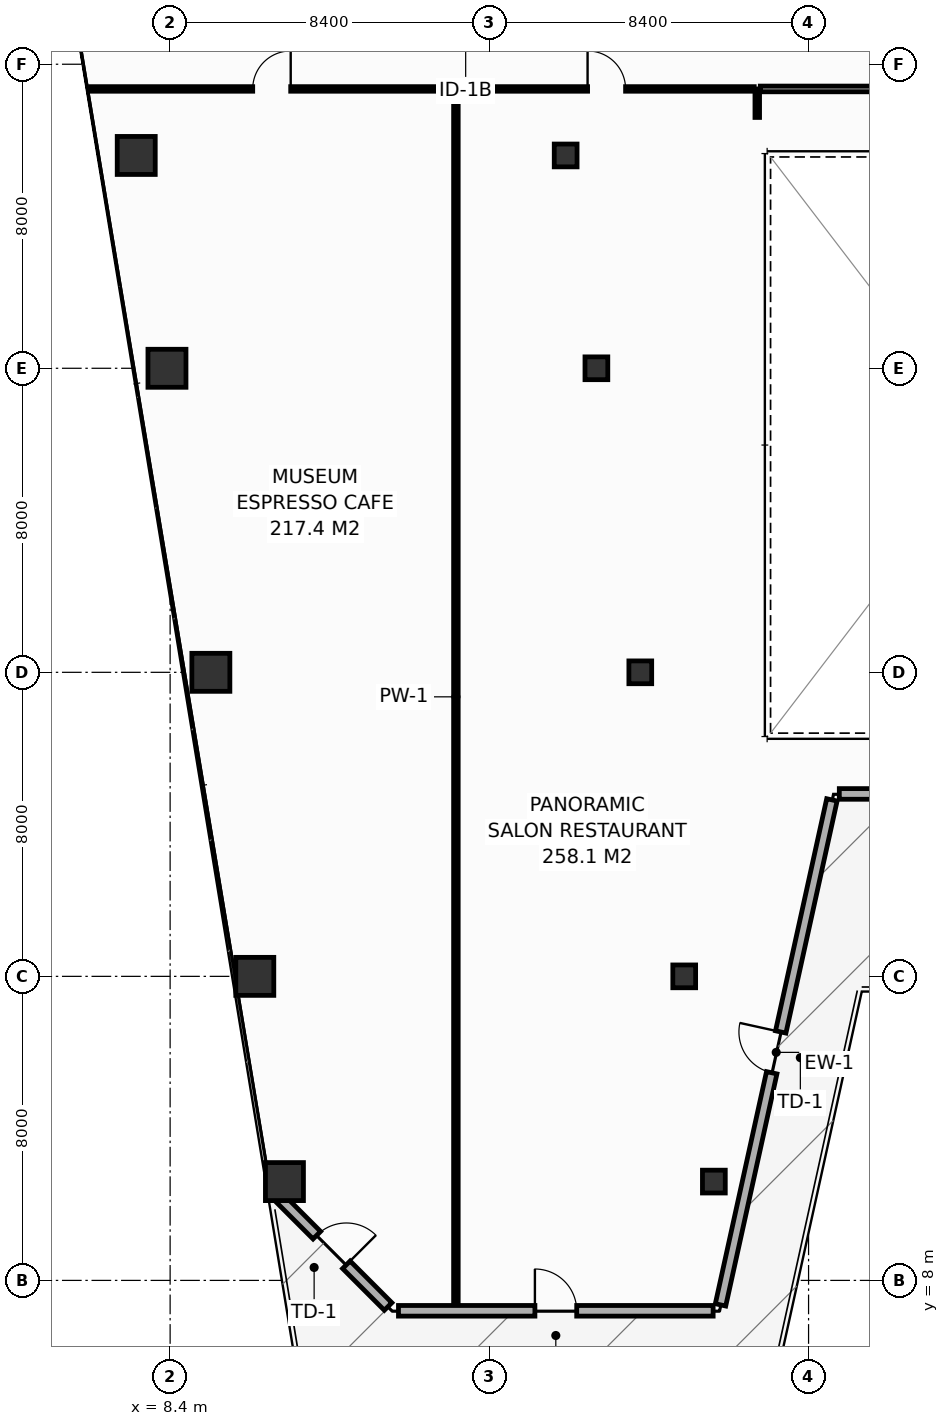
"""IFC4 building model, lengths in metres.
Left out: names, types, materials, properties, quantities, classifications, styles, units other than length and angle.
Written with IfcOpenShell. Run it as: python <this file> out.ifc"""

import sys

from ifc_helpers import new_model, si_unit, direction, frame, frame_2d, origin, origin_2d, place, context, subcontext, project, spatial, rectangle, hollow_rectangle, extrude, element, fill, save


model = new_model("IFC4")
c1 = context("Model", 3, precision=1e-05, world=origin(), true_north=direction((0.0, 1.0)))
c2 = subcontext(c1, "Body", "Model", "MODEL_VIEW")
j1 = project(units=[si_unit("LENGTHUNIT", "METRE"), si_unit("PLANEANGLEUNIT", "RADIAN")], contexts=[c1])
p1 = place(None, origin())
s1 = spatial("IfcSite", under=j1, at=p1, CompositionType="ELEMENT")
p2 = place(p1, origin())
s2 = spatial("IfcBuilding", under=s1, at=p2, CompositionType="ELEMENT")
p3 = place(p2, frame((0.0, 0.0, 101.6)))
s3 = spatial("IfcBuildingStorey", under=s2, at=p3, CompositionType="ELEMENT", Elevation=101.6)
p4 = place(p3, frame((11.408, 10.6, 0.0), z_axis=(0.0, 0.0, 1.0), x_axis=(1.0, 0.0, 0.0)))
e1 = element("IfcColumn", 1, at=p4, inside=s3, PredefinedType="COLUMN", context=c2, shape_type="SweptSolid", body=[
    extrude(hollow_rectangle(XDim=1.0, YDim=1.0, WallThickness=0.045, at=origin_2d()), origin(), (0.0, 0.0, 1.0), 4.4),
])
p5 = place(p3, frame((22.708, 10.6, 0.0), z_axis=(0.0, 0.0, 1.0), x_axis=(1.0, 0.0, 0.0)))
e2 = element("IfcColumn", 2, at=p5, inside=s3, PredefinedType="COLUMN", context=c2, shape_type="SweptSolid", body=[
    extrude(hollow_rectangle(XDim=0.6, YDim=0.6, WallThickness=0.028, at=origin_2d()), origin(), (0.0, 0.0, 1.0), 4.4),
])
p6 = place(p3, frame((10.628, 16.0, 0.0), z_axis=(0.0, 0.0, 1.0), x_axis=(1.0, 0.0, 0.0)))
e3 = element("IfcColumn", 3, at=p6, inside=s3, PredefinedType="COLUMN", context=c2, shape_type="SweptSolid", body=[
    extrude(hollow_rectangle(XDim=1.0, YDim=1.0, WallThickness=0.045, at=origin_2d()), origin(), (0.0, 0.0, 1.0), 4.4),
])
p7 = place(p3, frame((21.928, 16.0, 0.0), z_axis=(0.0, 0.0, 1.0), x_axis=(1.0, 0.0, 0.0)))
e4 = element("IfcColumn", 4, at=p7, inside=s3, PredefinedType="COLUMN", context=c2, shape_type="SweptSolid", body=[
    extrude(hollow_rectangle(XDim=0.6, YDim=0.6, WallThickness=0.028, at=origin_2d()), origin(), (0.0, 0.0, 1.0), 4.4),
])
p8 = place(p3, frame((9.472, 24.0, 0.0), z_axis=(0.0, 0.0, 1.0), x_axis=(1.0, 0.0, 0.0)))
e5 = element("IfcColumn", 5, at=p8, inside=s3, PredefinedType="COLUMN", context=c2, shape_type="SweptSolid", body=[
    extrude(hollow_rectangle(XDim=1.0, YDim=1.0, WallThickness=0.045, at=origin_2d()), origin(), (0.0, 0.0, 1.0), 4.4),
])
p9 = place(p3, frame((20.772, 24.0, 0.0), z_axis=(0.0, 0.0, 1.0), x_axis=(1.0, 0.0, 0.0)))
e6 = element("IfcColumn", 6, at=p9, inside=s3, PredefinedType="COLUMN", context=c2, shape_type="SweptSolid", body=[
    extrude(hollow_rectangle(XDim=0.6, YDim=0.6, WallThickness=0.028, at=origin_2d()), origin(), (0.0, 0.0, 1.0), 4.4),
])
p10 = place(p3, frame((8.317, 32.0, 0.0), z_axis=(0.0, 0.0, 1.0), x_axis=(1.0, 0.0, 0.0)))
e7 = element("IfcColumn", 7, at=p10, inside=s3, PredefinedType="COLUMN", context=c2, shape_type="SweptSolid", body=[
    extrude(hollow_rectangle(XDim=1.0, YDim=1.0, WallThickness=0.045, at=origin_2d()), origin(), (0.0, 0.0, 1.0), 4.4),
])
p11 = place(p3, frame((19.617, 32.0, 0.0), z_axis=(0.0, 0.0, 1.0), x_axis=(1.0, 0.0, 0.0)))
e8 = element("IfcColumn", 8, at=p11, inside=s3, PredefinedType="COLUMN", context=c2, shape_type="SweptSolid", body=[
    extrude(hollow_rectangle(XDim=0.6, YDim=0.6, WallThickness=0.028, at=origin_2d()), origin(), (0.0, 0.0, 1.0), 4.4),
])
p12 = place(p3, frame((7.508, 37.6, 0.0), z_axis=(0.0, 0.0, 1.0), x_axis=(1.0, 0.0, 0.0)))
e9 = element("IfcColumn", 9, at=p12, inside=s3, PredefinedType="COLUMN", context=c2, shape_type="SweptSolid", body=[
    extrude(hollow_rectangle(XDim=1.0, YDim=1.0, WallThickness=0.045, at=origin_2d()), origin(), (0.0, 0.0, 1.0), 4.4),
])
p13 = place(p3, frame((18.808, 37.6, 0.0), z_axis=(0.0, 0.0, 1.0), x_axis=(1.0, 0.0, 0.0)))
e10 = element("IfcColumn", 10, at=p13, inside=s3, PredefinedType="COLUMN", context=c2, shape_type="SweptSolid", body=[
    extrude(hollow_rectangle(XDim=0.6, YDim=0.6, WallThickness=0.028, at=origin_2d()), origin(), (0.0, 0.0, 1.0), 4.4),
])
p14 = place(p3, frame((11.162, 10.287, 0.0), z_axis=(0.0, 0.0, 1.0), x_axis=(0.70707775441, -0.707135806771, 0.0)))
e11 = element("IfcWall", 11, at=p14, inside=s3, PredefinedType="STANDARD", context=c2, shape_type="SweptSolid", body=[
    extrude(rectangle(XDim=4.206, YDim=0.28, at=frame_2d((2.103, 0.0))), origin(), (0.0, 0.0, 1.0), 4.15),
])
p15 = place(p14, frame((1.553, 0.0, 0.0)))
e12 = element("IfcOpeningElement", 12, at=p15, cuts=e11, PredefinedType="OPENING", context=c2, shape_type="SweptSolid", body=[
    extrude(rectangle(XDim=1.1, YDim=2.2, at=frame_2d((0.55, 1.1))), frame((0.0, 0.15, 0.0), z_axis=(0.0, -1.0, 0.0), x_axis=(1.0, 0.0, 0.0)), (0.0, 0.0, 1.0), 0.3),
])
p16 = place(p3, frame((14.409, 7.2, 0.0), z_axis=(0.0, 0.0, 1.0), x_axis=(1.0, 0.0, 0.0)))
e13 = element("IfcWall", 13, at=p16, inside=s3, PredefinedType="STANDARD", context=c2, shape_type="SweptSolid", body=[
    extrude(rectangle(XDim=8.28, YDim=0.28, at=frame_2d((4.14, 0.0))), origin(), (0.0, 0.0, 1.0), 4.15),
])
p17 = place(p16, frame((3.59, 0.0, 0.0)))
e14 = element("IfcOpeningElement", 14, at=p17, cuts=e13, PredefinedType="OPENING", context=c2, shape_type="SweptSolid", body=[
    extrude(rectangle(XDim=1.1, YDim=2.2, at=frame_2d((0.55, 1.1))), frame((0.0, 0.15, 0.0), z_axis=(0.0, -1.0, 0.0), x_axis=(1.0, 0.0, 0.0)), (0.0, 0.0, 1.0), 0.3),
])
p18 = place(p3, frame((22.883, 7.356, 0.0), z_axis=(0.0, 0.0, 1.0), x_axis=(0.215414184939, 0.976522774403, 0.0)))
e15 = element("IfcWall", 15, at=p18, inside=s3, PredefinedType="STANDARD", context=c2, shape_type="SweptSolid", body=[
    extrude(rectangle(XDim=13.607, YDim=0.28, at=frame_2d((6.803, 0.0))), origin(), (0.0, 0.0, 1.0), 4.15),
])
p19 = place(p18, frame((6.254, 0.0, 0.0)))
e16 = element("IfcOpeningElement", 16, at=p19, cuts=e15, PredefinedType="OPENING", context=c2, shape_type="SweptSolid", body=[
    extrude(rectangle(XDim=1.1, YDim=2.2, at=frame_2d((0.55, 1.1))), frame((0.0, 0.15, 0.0), z_axis=(0.0, -1.0, 0.0), x_axis=(1.0, 0.0, 0.0)), (0.0, 0.0, 1.0), 0.3),
])
p20 = place(p3, frame((26.009, 20.8, 0.0), z_axis=(0.0, 0.0, 1.0), x_axis=(1.0, 0.0, 0.0)))
e17 = element("IfcWall", 17, at=p20, inside=s3, PredefinedType="STANDARD", context=c2, shape_type="SweptSolid", body=[
    extrude(rectangle(XDim=7.982, YDim=0.28, at=frame_2d((3.991, 0.0))), origin(), (0.0, 0.0, 1.0), 4.15),
])
p21 = place(p20, frame((3.441, 0.0, 0.0)))
e18 = element("IfcOpeningElement", 18, at=p21, cuts=e17, PredefinedType="OPENING", context=c2, shape_type="SweptSolid", body=[
    extrude(rectangle(XDim=1.1, YDim=2.2, at=frame_2d((0.55, 1.1))), frame((0.0, 0.15, 0.0), z_axis=(0.0, -1.0, 0.0), x_axis=(1.0, 0.0, 0.0)), (0.0, 0.0, 1.0), 0.3),
])
p22 = place(p3, frame((15.92, 7.36, 0.0), z_axis=(0.0, 0.0, 1.0), x_axis=(0.0, 1.0, 0.0)))
e19 = element("IfcWall", 19, at=p22, inside=s3, PredefinedType="PARTITIONING", context=c2, shape_type="SweptSolid", body=[
    extrude(rectangle(XDim=31.99, YDim=0.12, at=frame_2d((15.995, 0.0))), origin(), (0.0, 0.0, 1.0), 3.335),
])
p23 = place(p3, frame((23.85, 38.6, 0.0), z_axis=(0.0, 0.0, 1.0), x_axis=(0.0, 1.0, 0.0)))
e20 = element("IfcWall", 20, at=p23, inside=s3, PredefinedType="PARTITIONING", context=c2, shape_type="SweptSolid", body=[
    extrude(rectangle(XDim=0.75, YDim=0.12, at=frame_2d((0.375, 0.0))), origin(), (0.0, 0.0, 1.0), 4.15),
])
p24 = place(p3, frame((6.305, 39.35, 0.0), z_axis=(0.0, 0.0, 1.0), x_axis=(1.0, 0.0, 0.0)))
e21 = element("IfcWall", 21, at=p24, inside=s3, PredefinedType="PARTITIONING", context=c2, shape_type="SweptSolid", body=[
    extrude(rectangle(XDim=9.535, YDim=0.12, at=frame_2d((4.768, 0.0))), origin(), (0.0, 0.0, 1.0), 3.635),
])
p25 = place(p24, frame((4.268, 0.0, 0.0)))
e22 = element("IfcOpeningElement", 22, at=p25, cuts=e21, PredefinedType="OPENING", context=c2, shape_type="SweptSolid", body=[
    extrude(rectangle(XDim=1.0, YDim=2.15, at=frame_2d((0.5, 1.075))), frame((0.0, 0.07, 0.0), z_axis=(0.0, -1.0, 0.0), x_axis=(1.0, 0.0, 0.0)), (0.0, 0.0, 1.0), 0.14),
])
p26 = place(p3, frame((16.0, 39.35, 0.0), z_axis=(0.0, 0.0, 1.0), x_axis=(1.0, 0.0, 0.0)))
e23 = element("IfcWall", 23, at=p26, inside=s3, PredefinedType="PARTITIONING", context=c2, shape_type="SweptSolid", body=[
    extrude(rectangle(XDim=7.77, YDim=0.12, at=frame_2d((3.885, 0.0))), origin(), (0.0, 0.0, 1.0), 3.335),
])
p27 = place(p26, frame((3.385, 0.0, 0.0)))
e24 = element("IfcOpeningElement", 24, at=p27, cuts=e23, PredefinedType="OPENING", context=c2, shape_type="SweptSolid", body=[
    extrude(rectangle(XDim=1.0, YDim=2.15, at=frame_2d((0.5, 1.075))), frame((0.0, 0.07, 0.0), z_axis=(0.0, -1.0, 0.0), x_axis=(1.0, 0.0, 0.0)), (0.0, 0.0, 1.0), 0.14),
])
p28 = place(p3, frame((23.93, 39.35, 0.0), z_axis=(0.0, 0.0, 1.0), x_axis=(1.0, 0.0, 0.0)))
e25 = element("IfcWall", 25, at=p28, inside=s3, PredefinedType="PARTITIONING", context=c2, shape_type="SweptSolid", body=[
    extrude(rectangle(XDim=12.14, YDim=0.15, at=frame_2d((6.07, 0.0))), origin(), (0.0, 0.0, 1.0), 4.15),
])
p29 = place(p15, origin())
e26 = element("IfcDoor", 26, at=p29, inside=s3, OperationType="SINGLE_SWING_RIGHT", PredefinedType="DOOR", context=c2, shape_type="SweptSolid", body=[
    extrude(rectangle(XDim=1.1, YDim=2.2, at=frame_2d((0.55, 1.1))), frame((0.0, 0.025, 0.0), z_axis=(0.0, -1.0, 0.0), x_axis=(1.0, 0.0, 0.0)), (0.0, 0.0, 1.0), 0.05),
])
fill(e12, e26)
p30 = place(p17, origin())
e27 = element("IfcDoor", 27, at=p30, inside=s3, OperationType="SINGLE_SWING_LEFT", PredefinedType="DOOR", context=c2, shape_type="SweptSolid", body=[
    extrude(rectangle(XDim=1.1, YDim=2.2, at=frame_2d((0.55, 1.1))), frame((0.0, 0.025, 0.0), z_axis=(0.0, -1.0, 0.0), x_axis=(1.0, 0.0, 0.0)), (0.0, 0.0, 1.0), 0.05),
])
fill(e14, e27)
p31 = place(p19, origin())
e28 = element("IfcDoor", 28, at=p31, inside=s3, OperationType="SINGLE_SWING_RIGHT", PredefinedType="DOOR", context=c2, shape_type="SweptSolid", body=[
    extrude(rectangle(XDim=1.1, YDim=2.2, at=frame_2d((0.55, 1.1))), frame((0.0, 0.025, 0.0), z_axis=(0.0, -1.0, 0.0), x_axis=(1.0, 0.0, 0.0)), (0.0, 0.0, 1.0), 0.05),
])
fill(e16, e28)
p32 = place(p25, origin())
e29 = element("IfcDoor", 29, at=p32, inside=s3, OperationType="SINGLE_SWING_RIGHT", PredefinedType="DOOR", context=c2, shape_type="SweptSolid", body=[
    extrude(rectangle(XDim=1.0, YDim=2.15, at=frame_2d((0.5, 1.075))), frame((0.0, 0.025, 0.0), z_axis=(0.0, -1.0, 0.0), x_axis=(1.0, 0.0, 0.0)), (0.0, 0.0, 1.0), 0.05),
])
fill(e22, e29)
p33 = place(p27, origin())
e30 = element("IfcDoor", 30, at=p33, inside=s3, OperationType="SINGLE_SWING_LEFT", PredefinedType="DOOR", context=c2, shape_type="SweptSolid", body=[
    extrude(rectangle(XDim=1.0, YDim=2.15, at=frame_2d((0.5, 1.075))), frame((0.0, 0.025, 0.0), z_axis=(0.0, -1.0, 0.0), x_axis=(1.0, 0.0, 0.0)), (0.0, 0.0, 1.0), 0.05),
])
fill(e24, e30)
save(model, sys.argv[1])
